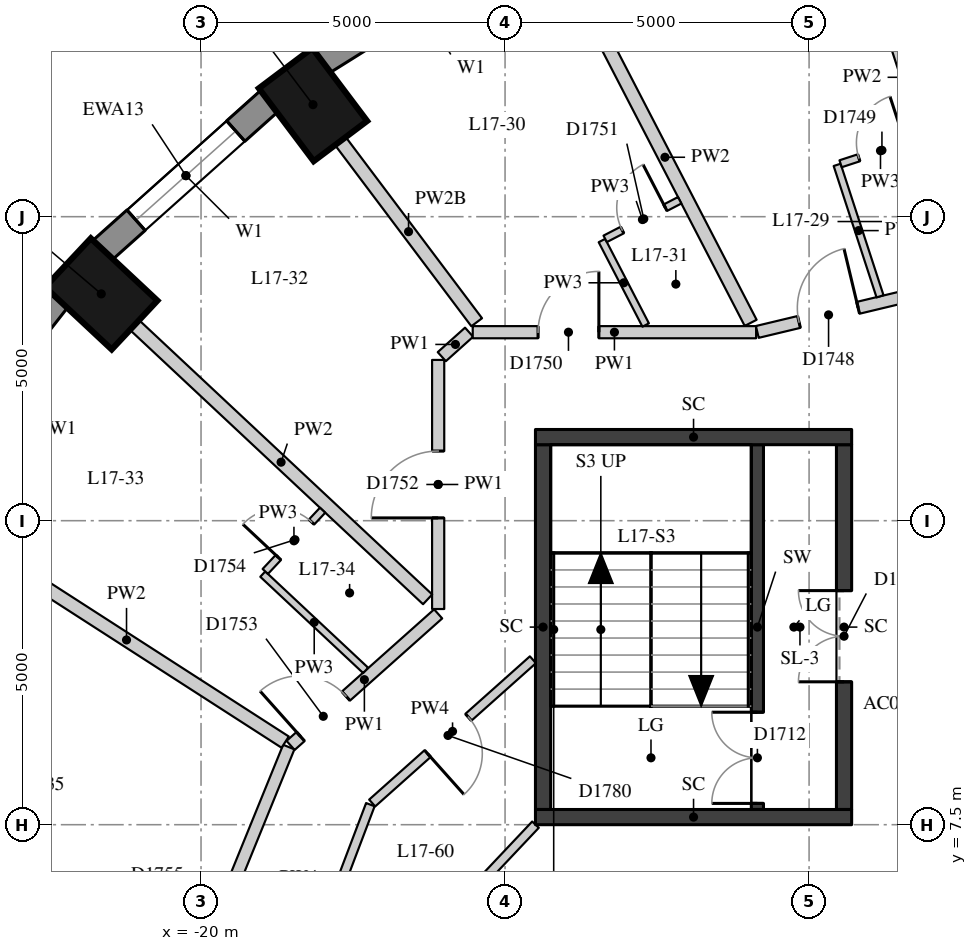
"""IFC4 building model, lengths in metres.
Left out: names, types, materials, properties, quantities, classifications, styles, units other than length and angle.
Written with IfcOpenShell. Run it as: python <this file> out.ifc"""

import sys

from ifc_helpers import new_model, si_unit, direction, frame, frame_2d, origin, origin_2d, place, context, subcontext, project, spatial, rectangle, extrude, element, fill, save


model = new_model("IFC4")
c1 = context("Model", 3, precision=1e-05, world=origin(), true_north=direction((0.0, 1.0)))
c2 = subcontext(c1, "Body", "Model", "MODEL_VIEW")
j1 = project(units=[si_unit("LENGTHUNIT", "METRE"), si_unit("PLANEANGLEUNIT", "RADIAN")], contexts=[c1])
p1 = place(None, origin())
s1 = spatial("IfcSite", under=j1, at=p1, CompositionType="ELEMENT")
p2 = place(p1, origin())
s2 = spatial("IfcBuilding", under=s1, at=p2, CompositionType="ELEMENT")
p3 = place(p2, frame((0.0, 0.0, 64.6)))
s3 = spatial("IfcBuildingStorey", under=s2, at=p3, CompositionType="ELEMENT", Elevation=64.6)
for number, where, z_axis, x_axis in (
    (1, (-18.159, 19.343, 0.0), (0.0, 0.0, 1.0), (-0.601, 0.799, 0.0)),
    (2, (-21.641, 16.23, 0.0), (0.0, 0.0, 1.0), (-0.73, 0.683, 0.0)),
):
    element("IfcColumn", number, at=place(p3, frame(where, z_axis=z_axis, x_axis=x_axis)), inside=s3, PredefinedType="COLUMN", context=c2, shape_type="SweptSolid", body=[
        extrude(rectangle(XDim=1.5, YDim=1.1, at=origin_2d()), origin(), (0.0, 0.0, 1.0), 3.3),
    ])
p4 = place(p3, frame((-14.817, 22.051, 0.0), z_axis=(0.0, 0.0, 1.0), x_axis=(-0.847635480093, -0.530579016629, 0.0)))
e3 = element("IfcWall", 3, at=p4, inside=s3, PredefinedType="SOLIDWALL", context=c2, shape_type="SweptSolid", body=[
    extrude(rectangle(XDim=3.782, YDim=0.45, at=frame_2d((1.891, 0.0))), origin(), (0.0, 0.0, 1.0), 3.02),
])
p5 = place(p4, frame((0.791, 0.0, 0.4)))
e4 = element("IfcOpeningElement", 4, at=p5, cuts=e3, PredefinedType="OPENING", context=c2, shape_type="SweptSolid", body=[
    extrude(rectangle(XDim=2.2, YDim=1.75, at=frame_2d((1.1, 0.875))), frame((0.0, 0.235, 0.0), z_axis=(0.0, -1.0, 0.0), x_axis=(1.0, 0.0, 0.0)), (0.0, 0.0, 1.0), 0.47),
])
p6 = place(p3, frame((-18.871, 19.407, 0.0), z_axis=(0.0, 0.0, 1.0), x_axis=(-0.745526233716, -0.66647628228, 0.0)))
e5 = element("IfcWall", 5, at=p6, inside=s3, PredefinedType="SOLIDWALL", context=c2, shape_type="SweptSolid", body=[
    extrude(rectangle(XDim=3.697, YDim=0.45, at=frame_2d((1.848, 0.0))), origin(), (0.0, 0.0, 1.0), 3.02),
])
p7 = place(p6, frame((0.749, 0.0, 0.4)))
e6 = element("IfcOpeningElement", 6, at=p7, cuts=e5, PredefinedType="OPENING", context=c2, shape_type="SweptSolid", body=[
    extrude(rectangle(XDim=2.2, YDim=1.75, at=frame_2d((1.1, 0.875))), frame((0.0, 0.235, 0.0), z_axis=(0.0, -1.0, 0.0), x_axis=(1.0, 0.0, 0.0)), (0.0, 0.0, 1.0), 0.47),
])
p8 = place(p3, frame((-22.352, 16.17, 0.0), z_axis=(0.0, 0.0, 1.0), x_axis=(-0.616661975264, -0.787228053529, 0.0)))
e7 = element("IfcWall", 7, at=p8, inside=s3, PredefinedType="SOLIDWALL", context=c2, shape_type="SweptSolid", body=[
    extrude(rectangle(XDim=3.61, YDim=0.45, at=frame_2d((1.805, 0.0))), origin(), (0.0, 0.0, 1.0), 3.02),
])
p9 = place(p8, frame((0.705, 0.0, 0.4)))
e8 = element("IfcOpeningElement", 8, at=p9, cuts=e7, PredefinedType="OPENING", context=c2, shape_type="SweptSolid", body=[
    extrude(rectangle(XDim=2.2, YDim=1.75, at=frame_2d((1.1, 0.875))), frame((0.0, 0.235, 0.0), z_axis=(0.0, -1.0, 0.0), x_axis=(1.0, 0.0, 0.0)), (0.0, 0.0, 1.0), 0.47),
])
p10 = place(p3, frame((-10.85, 7.75, 0.0), z_axis=(0.0, 0.0, 1.0), x_axis=(0.0, 1.0, 0.0)))
e9 = element("IfcWall", 9, at=p10, inside=s3, PredefinedType="SHEAR", context=c2, shape_type="SweptSolid", body=[
    extrude(rectangle(XDim=6.0, YDim=0.2, at=frame_2d((3.0, 0.0))), origin(), (0.0, 0.0, 1.0), 3.02),
])
p11 = place(p10, frame((0.1, 0.0, 0.0)))
e10 = element("IfcOpeningElement", 10, at=p11, cuts=e9, PredefinedType="OPENING", context=c2, shape_type="SweptSolid", body=[
    extrude(rectangle(XDim=1.5, YDim=2.1, at=frame_2d((0.75, 1.05))), frame((0.0, 0.11, 0.0), z_axis=(0.0, -1.0, 0.0), x_axis=(1.0, 0.0, 0.0)), (0.0, 0.0, 1.0), 0.22),
])
p12 = place(p3, frame((-14.375, 7.75, -0.28), z_axis=(0.0, 0.0, 1.0), x_axis=(0.0, 1.0, 0.0)))
e11 = element("IfcWall", 11, at=p12, inside=s3, PredefinedType="SHEAR", context=c2, shape_type="SweptSolid", body=[
    extrude(rectangle(XDim=6.0, YDim=0.25, at=frame_2d((3.0, 0.0))), origin(), (0.0, 0.0, 1.0), 3.3),
])
p13 = place(p3, frame((-9.425, 7.75, -0.28), z_axis=(0.0, 0.0, 1.0), x_axis=(0.0, 1.0, 0.0)))
e12 = element("IfcWall", 12, at=p13, inside=s3, PredefinedType="SHEAR", context=c2, shape_type="SweptSolid", body=[
    extrude(rectangle(XDim=6.0, YDim=0.25, at=frame_2d((3.0, 0.0))), origin(), (0.0, 0.0, 1.0), 3.3),
])
p14 = place(p13, frame((2.1, 0.0, 0.28)))
e13 = element("IfcOpeningElement", 13, at=p14, cuts=e12, PredefinedType="OPENING", context=c2, shape_type="SweptSolid", body=[
    extrude(rectangle(XDim=1.5, YDim=2.1, at=frame_2d((0.75, 1.05))), frame((0.0, 0.135, 0.0), z_axis=(0.0, -1.0, 0.0), x_axis=(1.0, 0.0, 0.0)), (0.0, 0.0, 1.0), 0.27),
])
for number, where, z_axis, x_axis in (
    (14, (-14.5, 13.875, -0.28), (0.0, 0.0, 1.0), (1.0, 0.0, 0.0)),
    (15, (-14.5, 7.625, -0.28), (0.0, 0.0, 1.0), (1.0, 0.0, 0.0)),
):
    element("IfcWall", number, at=place(p3, frame(where, z_axis=z_axis, x_axis=x_axis)), inside=s3, PredefinedType="SHEAR", context=c2, shape_type="SweptSolid", body=[
        extrude(rectangle(XDim=5.2, YDim=0.25, at=frame_2d((2.6, 0.0))), origin(), (0.0, 0.0, 1.0), 3.3),
    ])
p15 = place(p3, frame((-20.861, 3.121, 0.0), z_axis=(0.0, 0.0, 1.0), x_axis=(0.377214346955, 0.926125983034, 0.0)))
e16 = element("IfcWall", 16, at=p15, inside=s3, PredefinedType="PARTITIONING", context=c2, shape_type="SweptSolid", body=[
    extrude(rectangle(XDim=6.107, YDim=0.2, at=frame_2d((3.054, 0.0))), origin(), (0.0, 0.0, 1.0), 3.02),
])
p16 = place(p15, frame((2.285, 0.0, 0.0)))
e17 = element("IfcOpeningElement", 17, at=p16, cuts=e16, PredefinedType="OPENING", context=c2, shape_type="SweptSolid", body=[
    extrude(rectangle(XDim=1.1, YDim=2.1, at=frame_2d((0.55, 1.05))), frame((0.0, 0.11, 0.0), z_axis=(0.0, -1.0, 0.0), x_axis=(1.0, 0.0, 0.0)), (0.0, 0.0, 1.0), 0.22),
])
p17 = place(p3, frame((-18.527, 8.804, 0.0), z_axis=(0.0, 0.0, 1.0), x_axis=(0.746493000154, 0.665393267716, 0.0)))
e18 = element("IfcWall", 18, at=p17, inside=s3, PredefinedType="PARTITIONING", context=c2, shape_type="SweptSolid", body=[
    extrude(rectangle(XDim=3.251, YDim=0.2, at=frame_2d((1.625, 0.0))), origin(), (0.0, 0.0, 1.0), 3.02),
])
p18 = place(p17, frame((0.22, 0.0, 0.0)))
e19 = element("IfcOpeningElement", 19, at=p18, cuts=e18, PredefinedType="OPENING", context=c2, shape_type="SweptSolid", body=[
    extrude(rectangle(XDim=1.0, YDim=2.1, at=frame_2d((0.5, 1.05))), frame((0.0, 0.11, 0.0), z_axis=(0.0, -1.0, 0.0), x_axis=(1.0, 0.0, 0.0)), (0.0, 0.0, 1.0), 0.22),
])
p19 = place(p3, frame((-16.1, 11.047, 0.0), z_axis=(0.0, 0.0, 1.0), x_axis=(0.0, 1.0, 0.0)))
e20 = element("IfcWall", 20, at=p19, inside=s3, PredefinedType="PARTITIONING", context=c2, shape_type="SweptSolid", body=[
    extrude(rectangle(XDim=4.097, YDim=0.2, at=frame_2d((2.048, 0.0))), origin(), (0.0, 0.0, 1.0), 3.02),
])
p20 = place(p19, frame((1.499, 0.0, 0.0)))
e21 = element("IfcOpeningElement", 21, at=p20, cuts=e20, PredefinedType="OPENING", context=c2, shape_type="SweptSolid", body=[
    extrude(rectangle(XDim=1.1, YDim=2.1, at=frame_2d((0.55, 1.05))), frame((0.0, 0.11, 0.0), z_axis=(0.0, -1.0, 0.0), x_axis=(1.0, 0.0, 0.0)), (0.0, 0.0, 1.0), 0.22),
])
p21 = place(p3, frame((-16.041, 15.198, 0.0), z_axis=(0.0, 0.0, 1.0), x_axis=(0.744722115519, 0.667374685359, 0.0)))
e22 = element("IfcWall", 22, at=p21, inside=s3, PredefinedType="PARTITIONING", context=c2, shape_type="SweptSolid", body=[
    extrude(rectangle(XDim=0.603, YDim=0.2, at=frame_2d((0.301, 0.0))), origin(), (0.0, 0.0, 1.0), 3.02),
])
p22 = place(p3, frame((-15.531, 15.6, 0.0), z_axis=(0.0, 0.0, 1.0), x_axis=(1.0, 0.0, 0.0)))
e23 = element("IfcWall", 23, at=p22, inside=s3, PredefinedType="PARTITIONING", context=c2, shape_type="SweptSolid", body=[
    extrude(rectangle(XDim=4.66, YDim=0.2, at=frame_2d((2.33, 0.0))), origin(), (0.0, 0.0, 1.0), 3.02),
])
p23 = place(p22, frame((1.074, 0.0, 0.0)))
e24 = element("IfcOpeningElement", 24, at=p23, cuts=e23, PredefinedType="OPENING", context=c2, shape_type="SweptSolid", body=[
    extrude(rectangle(XDim=1.0, YDim=2.1, at=frame_2d((0.5, 1.05))), frame((0.0, 0.11, 0.0), z_axis=(0.0, -1.0, 0.0), x_axis=(1.0, 0.0, 0.0)), (0.0, 0.0, 1.0), 0.22),
])
p24 = place(p3, frame((-10.852, 15.605, 0.0), z_axis=(0.0, 0.0, 1.0), x_axis=(0.972573296372, 0.232596610431, 0.0)))
e25 = element("IfcWall", 25, at=p24, inside=s3, PredefinedType="PARTITIONING", context=c2, shape_type="SweptSolid", body=[
    extrude(rectangle(XDim=11.157, YDim=0.2, at=frame_2d((5.579, 0.0))), origin(), (0.0, 0.0, 1.0), 3.02),
])
p25 = place(p24, frame((6.029, 0.0, 0.0)))
e26 = element("IfcOpeningElement", 26, at=p25, cuts=e25, PredefinedType="OPENING", context=c2, shape_type="SweptSolid", body=[
    extrude(rectangle(XDim=1.1, YDim=2.1, at=frame_2d((0.55, 1.05))), frame((0.0, 0.11, 0.0), z_axis=(0.0, -1.0, 0.0), x_axis=(1.0, 0.0, 0.0)), (0.0, 0.0, 1.0), 0.22),
])
p26 = place(p24, frame((0.705, 0.0, 0.0)))
e27 = element("IfcOpeningElement", 27, at=p26, cuts=e25, PredefinedType="OPENING", context=c2, shape_type="SweptSolid", body=[
    extrude(rectangle(XDim=1.0, YDim=2.1, at=frame_2d((0.5, 1.05))), frame((0.0, 0.11, 0.0), z_axis=(0.0, -1.0, 0.0), x_axis=(1.0, 0.0, 0.0)), (0.0, 0.0, 1.0), 0.22),
])
p27 = place(p3, frame((-14.499, 7.501, 0.0), z_axis=(0.0, 0.0, 1.0), x_axis=(-0.686403699782, -0.727220709913, 0.0)))
e28 = element("IfcWall", 28, at=p27, inside=s3, PredefinedType="PARTITIONING", context=c2, shape_type="SweptSolid", body=[
    extrude(rectangle(XDim=6.915, YDim=0.15, at=frame_2d((3.457, 0.0))), origin(), (0.0, 0.0, 1.0), 3.02),
])
p28 = place(p3, frame((-19.118, 2.811, 0.0), z_axis=(0.0, 0.0, 1.0), x_axis=(0.35451573991, 0.935050046872, 0.0)))
e29 = element("IfcWall", 29, at=p28, inside=s3, PredefinedType="PARTITIONING", context=c2, shape_type="SweptSolid", body=[
    extrude(rectangle(XDim=5.367, YDim=0.15, at=frame_2d((2.684, 0.0))), origin(), (0.0, 0.0, 1.0), 3.02),
])
p29 = place(p3, frame((-17.185, 7.856, 0.0), z_axis=(0.0, 0.0, 1.0), x_axis=(0.746480516634, 0.665407272493, 0.0)))
e30 = element("IfcWall", 30, at=p29, inside=s3, PredefinedType="PARTITIONING", context=c2, shape_type="SweptSolid", body=[
    extrude(rectangle(XDim=3.541, YDim=0.15, at=frame_2d((1.771, 0.0))), origin(), (0.0, 0.0, 1.0), 3.02),
])
p30 = place(p29, frame((1.221, 0.0, 0.0)))
e31 = element("IfcOpeningElement", 31, at=p30, cuts=e30, PredefinedType="OPENING", context=c2, shape_type="SweptSolid", body=[
    extrude(rectangle(XDim=0.9, YDim=2.1, at=frame_2d((0.45, 1.05))), frame((0.0, 0.085, 0.0), z_axis=(0.0, -1.0, 0.0), x_axis=(1.0, 0.0, 0.0)), (0.0, 0.0, 1.0), 0.17),
])
p31 = place(p3, frame((-9.429, 23.014, 0.0), z_axis=(0.0, 0.0, 1.0), x_axis=(0.310223739243, -0.950663574357, 0.0)))
e32 = element("IfcWall", 32, at=p31, inside=s3, PredefinedType="PARTITIONING", context=c2, shape_type="SweptSolid", body=[
    extrude(rectangle(XDim=6.778, YDim=0.22, at=frame_2d((3.389, 0.0))), origin(), (0.0, 0.0, 1.0), 3.02),
])
p32 = place(p3, frame((-13.78, 21.201, 0.0), z_axis=(0.0, 0.0, 1.0), x_axis=(0.459699000582, -0.888074787878, 0.0)))
e33 = element("IfcWall", 33, at=p32, inside=s3, PredefinedType="PARTITIONING", context=c2, shape_type="SweptSolid", body=[
    extrude(rectangle(XDim=6.134, YDim=0.22, at=frame_2d((3.067, 0.0))), origin(), (0.0, 0.0, 1.0), 3.02),
])
p33 = place(p3, frame((-17.708, 18.743, 0.0), z_axis=(0.0, 0.0, 1.0), x_axis=(0.601172757903, -0.799119086967, 0.0)))
e34 = element("IfcWall", 34, at=p33, inside=s3, PredefinedType="PARTITIONING", context=c2, shape_type="SweptSolid", body=[
    extrude(rectangle(XDim=3.729, YDim=0.22, at=frame_2d((1.864, 0.0))), origin(), (0.0, 0.0, 1.0), 2.57),
])
p34 = place(p3, frame((-21.093, 15.718, 0.0), z_axis=(0.0, 0.0, 1.0), x_axis=(0.73009284205, -0.683347965525, 0.0)))
e35 = element("IfcWall", 35, at=p34, inside=s3, PredefinedType="PARTITIONING", context=c2, shape_type="SweptSolid", body=[
    extrude(rectangle(XDim=6.602, YDim=0.22, at=frame_2d((3.301, 0.0))), origin(), (0.0, 0.0, 1.0), 3.02),
])
p35 = place(p3, frame((-23.835, 12.219, 0.0), z_axis=(0.0, 0.0, 1.0), x_axis=(0.840743714791, -0.541433288633, 0.0)))
e36 = element("IfcWall", 36, at=p35, inside=s3, PredefinedType="PARTITIONING", context=c2, shape_type="SweptSolid", body=[
    extrude(rectangle(XDim=6.207, YDim=0.22, at=frame_2d((3.104, 0.0))), origin(), (0.0, 0.0, 1.0), 3.02),
])
p36 = place(p3, frame((-8.833, 16.19, 0.0), z_axis=(0.0, 0.0, 1.0), x_axis=(-0.310231525188, 0.950661033586, 0.0)))
e37 = element("IfcWall", 37, at=p36, inside=s3, PredefinedType="PARTITIONING", context=c2, shape_type="SweptSolid", body=[
    extrude(rectangle(XDim=2.274, YDim=0.12, at=frame_2d((1.137, 0.0))), origin(), (0.0, 0.0, 1.0), 3.02),
])
p37 = place(p3, frame((-12.687, 15.718, 0.0), z_axis=(0.0, 0.0, 1.0), x_axis=(-0.459775159711, 0.888035361071, 0.0)))
e38 = element("IfcWall", 38, at=p37, inside=s3, PredefinedType="PARTITIONING", context=c2, shape_type="SweptSolid", body=[
    extrude(rectangle(XDim=1.565, YDim=0.12, at=frame_2d((0.782, 0.0))), origin(), (0.0, 0.0, 1.0), 3.02),
])
p38 = place(p3, frame((-17.293, 10.038, 0.0), z_axis=(0.0, 0.0, 1.0), x_axis=(-0.730059424734, 0.683383667026, 0.0)))
e39 = element("IfcWall", 39, at=p38, inside=s3, PredefinedType="PARTITIONING", context=c2, shape_type="SweptSolid", body=[
    extrude(rectangle(XDim=2.317, YDim=0.12, at=frame_2d((1.159, 0.0))), origin(), (0.0, 0.0, 1.0), 3.02),
])
p39 = place(p3, frame((-9.481, 18.371, 0.0), z_axis=(0.0, 0.0, 1.0), x_axis=(0.950576687533, 0.310489872812, 0.0)))
e40 = element("IfcWall", 40, at=p39, inside=s3, PredefinedType="PARTITIONING", context=c2, shape_type="SweptSolid", body=[
    extrude(rectangle(XDim=1.38, YDim=0.12, at=frame_2d((0.69, 0.0))), origin(), (0.0, 0.0, 1.0), 3.02),
])
p40 = place(p39, frame((0.315, 0.0, 0.0)))
e41 = element("IfcOpeningElement", 41, at=p40, cuts=e40, PredefinedType="OPENING", context=c2, shape_type="SweptSolid", body=[
    extrude(rectangle(XDim=0.8, YDim=2.1, at=frame_2d((0.4, 1.05))), frame((0.0, 0.07, 0.0), z_axis=(0.0, -1.0, 0.0), x_axis=(1.0, 0.0, 0.0)), (0.0, 0.0, 1.0), 0.14),
])
p41 = place(p3, frame((-13.353, 17.135, 0.0), z_axis=(0.0, 0.0, 1.0), x_axis=(0.888075681402, 0.459697274413, 0.0)))
e42 = element("IfcWall", 42, at=p41, inside=s3, PredefinedType="PARTITIONING", context=c2, shape_type="SweptSolid", body=[
    extrude(rectangle(XDim=1.38, YDim=0.12, at=frame_2d((0.69, 0.0))), origin(), (0.0, 0.0, 1.0), 3.02),
])
p42 = place(p41, frame((0.315, 0.0, 0.0)))
e43 = element("IfcOpeningElement", 43, at=p42, cuts=e42, PredefinedType="OPENING", context=c2, shape_type="SweptSolid", body=[
    extrude(rectangle(XDim=0.8, YDim=2.1, at=frame_2d((0.4, 1.05))), frame((0.0, 0.07, 0.0), z_axis=(0.0, -1.0, 0.0), x_axis=(1.0, 0.0, 0.0)), (0.0, 0.0, 1.0), 0.14),
])
p43 = place(p3, frame((-18.943, 11.665, 0.0), z_axis=(0.0, 0.0, 1.0), x_axis=(0.683364094355, 0.730077745549, 0.0)))
e44 = element("IfcWall", 44, at=p43, inside=s3, PredefinedType="PARTITIONING", context=c2, shape_type="SweptSolid", body=[
    extrude(rectangle(XDim=1.38, YDim=0.12, at=frame_2d((0.69, 0.0))), origin(), (0.0, 0.0, 1.0), 3.02),
])
p44 = place(p43, frame((0.315, 0.0, 0.0)))
e45 = element("IfcOpeningElement", 45, at=p44, cuts=e44, PredefinedType="OPENING", context=c2, shape_type="SweptSolid", body=[
    extrude(rectangle(XDim=0.8, YDim=2.1, at=frame_2d((0.4, 1.05))), frame((0.0, 0.07, 0.0), z_axis=(0.0, -1.0, 0.0), x_axis=(1.0, 0.0, 0.0)), (0.0, 0.0, 1.0), 0.14),
])
p45 = place(p7, origin())
e46 = element("IfcWindow", 46, at=p45, inside=s3, PartitioningType="SINGLE_PANEL", PredefinedType="WINDOW", context=c2, shape_type="SweptSolid", body=[
    extrude(rectangle(XDim=2.2, YDim=1.75, at=frame_2d((1.1, 0.875))), frame((0.0, 0.035, 0.0), z_axis=(0.0, -1.0, 0.0), x_axis=(1.0, 0.0, 0.0)), (0.0, 0.0, 1.0), 0.06),
])
fill(e6, e46)
p46 = place(p11, origin())
e47 = element("IfcDoor", 47, at=p46, inside=s3, OperationType="DOUBLE_DOOR_SINGLE_SWING", PredefinedType="DOOR", context=c2, shape_type="SweptSolid", body=[
    extrude(rectangle(XDim=1.5, YDim=2.1, at=frame_2d((0.75, 1.05))), frame((0.0, 0.025, 0.0), z_axis=(0.0, -1.0, 0.0), x_axis=(1.0, 0.0, 0.0)), (0.0, 0.0, 1.0), 0.05),
])
fill(e10, e47)
p47 = place(p14, origin())
e48 = element("IfcDoor", 48, at=p47, inside=s3, OperationType="DOUBLE_DOOR_SINGLE_SWING", PredefinedType="DOOR", context=c2, shape_type="SweptSolid", body=[
    extrude(rectangle(XDim=1.5, YDim=2.1, at=frame_2d((0.75, 1.05))), frame((0.0, 0.025, 0.0), z_axis=(0.0, -1.0, 0.0), x_axis=(1.0, 0.0, 0.0)), (0.0, 0.0, 1.0), 0.05),
])
fill(e13, e48)
p48 = place(p26, origin())
e49 = element("IfcDoor", 49, at=p48, inside=s3, OperationType="SINGLE_SWING_RIGHT", PredefinedType="DOOR", context=c2, shape_type="SweptSolid", body=[
    extrude(rectangle(XDim=1.0, YDim=2.1, at=frame_2d((0.5, 1.05))), frame((0.0, 0.025, 0.0), z_axis=(0.0, -1.0, 0.0), x_axis=(1.0, 0.0, 0.0)), (0.0, 0.0, 1.0), 0.05),
])
fill(e27, e49)
p49 = place(p40, origin())
e50 = element("IfcDoor", 50, at=p49, inside=s3, OperationType="SINGLE_SWING_RIGHT", PredefinedType="DOOR", context=c2, shape_type="SweptSolid", body=[
    extrude(rectangle(XDim=0.8, YDim=2.1, at=frame_2d((0.4, 1.05))), frame((0.0, 0.025, 0.0), z_axis=(0.0, -1.0, 0.0), x_axis=(1.0, 0.0, 0.0)), (0.0, 0.0, 1.0), 0.05),
])
fill(e41, e50)
p50 = place(p23, origin())
e51 = element("IfcDoor", 51, at=p50, inside=s3, OperationType="SINGLE_SWING_RIGHT", PredefinedType="DOOR", context=c2, shape_type="SweptSolid", body=[
    extrude(rectangle(XDim=1.0, YDim=2.1, at=frame_2d((0.5, 1.05))), frame((0.0, 0.025, 0.0), z_axis=(0.0, -1.0, 0.0), x_axis=(1.0, 0.0, 0.0)), (0.0, 0.0, 1.0), 0.05),
])
fill(e24, e51)
p51 = place(p42, origin())
e52 = element("IfcDoor", 52, at=p51, inside=s3, OperationType="SINGLE_SWING_RIGHT", PredefinedType="DOOR", context=c2, shape_type="SweptSolid", body=[
    extrude(rectangle(XDim=0.8, YDim=2.1, at=frame_2d((0.4, 1.05))), frame((0.0, 0.025, 0.0), z_axis=(0.0, -1.0, 0.0), x_axis=(1.0, 0.0, 0.0)), (0.0, 0.0, 1.0), 0.05),
])
fill(e43, e52)
p52 = place(p20, origin())
e53 = element("IfcDoor", 53, at=p52, inside=s3, OperationType="SINGLE_SWING_LEFT", PredefinedType="DOOR", context=c2, shape_type="SweptSolid", body=[
    extrude(rectangle(XDim=1.1, YDim=2.1, at=frame_2d((0.55, 1.05))), frame((0.0, 0.025, 0.0), z_axis=(0.0, -1.0, 0.0), x_axis=(1.0, 0.0, 0.0)), (0.0, 0.0, 1.0), 0.05),
])
fill(e21, e53)
p53 = place(p18, origin())
e54 = element("IfcDoor", 54, at=p53, inside=s3, OperationType="SINGLE_SWING_LEFT", PredefinedType="DOOR", context=c2, shape_type="SweptSolid", body=[
    extrude(rectangle(XDim=1.0, YDim=2.1, at=frame_2d((0.5, 1.05))), frame((0.0, 0.025, 0.0), z_axis=(0.0, -1.0, 0.0), x_axis=(1.0, 0.0, 0.0)), (0.0, 0.0, 1.0), 0.05),
])
fill(e19, e54)
p54 = place(p44, origin())
e55 = element("IfcDoor", 55, at=p54, inside=s3, OperationType="SINGLE_SWING_LEFT", PredefinedType="DOOR", context=c2, shape_type="SweptSolid", body=[
    extrude(rectangle(XDim=0.8, YDim=2.1, at=frame_2d((0.4, 1.05))), frame((0.0, 0.025, 0.0), z_axis=(0.0, -1.0, 0.0), x_axis=(1.0, 0.0, 0.0)), (0.0, 0.0, 1.0), 0.05),
])
fill(e45, e55)
p55 = place(p30, origin())
e56 = element("IfcDoor", 56, at=p55, inside=s3, OperationType="SINGLE_SWING_RIGHT", PredefinedType="DOOR", context=c2, shape_type="SweptSolid", body=[
    extrude(rectangle(XDim=0.9, YDim=2.1, at=frame_2d((0.45, 1.05))), frame((0.0, 0.025, 0.0), z_axis=(0.0, -1.0, 0.0), x_axis=(1.0, 0.0, 0.0)), (0.0, 0.0, 1.0), 0.05),
])
fill(e31, e56)
save(model, sys.argv[1])
